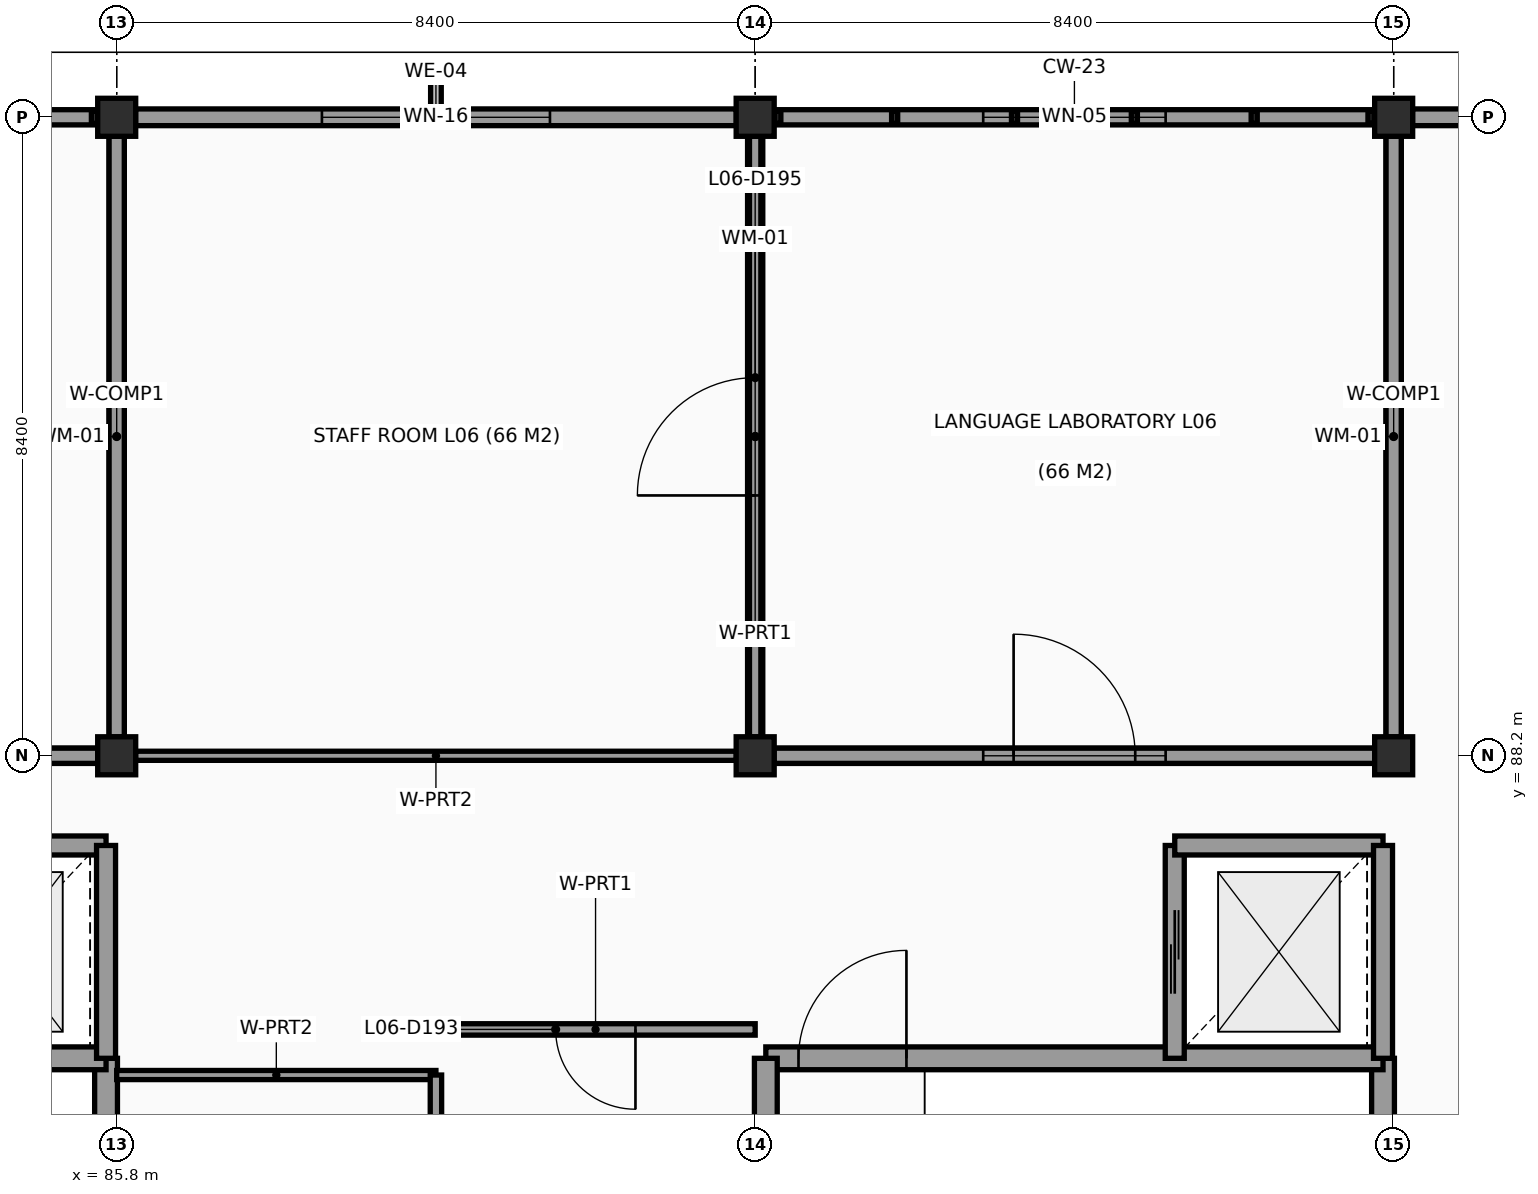
"""IFC4 building model, lengths in metres.
Left out: names, types, materials, properties, quantities, classifications, styles, units other than length and angle.
Written with IfcOpenShell. Run it as: python <this file> out.ifc"""

import sys

from ifc_helpers import new_model, si_unit, direction, frame, frame_2d, origin, origin_2d, place, context, subcontext, project, spatial, rectangle, extrude, element, fill, save


model = new_model("IFC4")
c1 = context("Model", 3, precision=1e-05, world=origin(), true_north=direction((0.0, 1.0)))
c2 = subcontext(c1, "Body", "Model", "MODEL_VIEW")
j1 = project(units=[si_unit("LENGTHUNIT", "METRE"), si_unit("PLANEANGLEUNIT", "RADIAN")], contexts=[c1])
p1 = place(None, origin())
s1 = spatial("IfcSite", under=j1, at=p1, CompositionType="ELEMENT")
p2 = place(p1, origin())
s2 = spatial("IfcBuilding", under=s1, at=p2, CompositionType="ELEMENT")
p3 = place(p2, frame((0.0, 0.0, 22.2)))
s3 = spatial("IfcBuildingStorey", under=s2, at=p3, CompositionType="ELEMENT", Elevation=22.2)
for number, where, z_axis, x_axis in (
    (1, (85.8, 88.2, 0.0), (0.0, 0.0, 1.0), (1.0, 0.0, 0.0)),
    (2, (85.8, 96.6, 0.0), (0.0, 0.0, 1.0), (1.0, 0.0, 0.0)),
    (3, (94.2, 88.2, 0.0), (0.0, 0.0, 1.0), (1.0, 0.0, 0.0)),
    (4, (94.2, 96.6, 0.0), (0.0, 0.0, 1.0), (1.0, 0.0, 0.0)),
    (5, (102.6, 88.2, 0.0), (0.0, 0.0, 1.0), (1.0, 0.0, 0.0)),
    (6, (102.6, 96.6, 0.0), (0.0, 0.0, 1.0), (1.0, 0.0, 0.0)),
):
    element("IfcColumn", number, at=place(p3, frame(where, z_axis=z_axis, x_axis=x_axis)), inside=s3, PredefinedType="COLUMN", context=c2, shape_type="SweptSolid", body=[
        extrude(rectangle(XDim=0.5, YDim=0.5, at=origin_2d()), origin(), (0.0, 0.0, 1.0), 3.38),
    ])
p4 = place(p3, frame((86.048, 96.6, 0.0), z_axis=(0.0, 0.0, 1.0), x_axis=(1.0, 0.0, 0.0)))
e7 = element("IfcWall", 7, at=p4, inside=s3, PredefinedType="SOLIDWALL", context=c2, shape_type="SweptSolid", body=[
    extrude(rectangle(XDim=7.904, YDim=0.22, at=frame_2d((3.952, 0.0))), origin(), (0.0, 0.0, 1.0), 2.68),
])
p5 = place(p4, frame((2.452, 0.0, 0.95)))
e8 = element("IfcOpeningElement", 8, at=p5, cuts=e7, PredefinedType="OPENING", context=c2, shape_type="SweptSolid", body=[
    extrude(rectangle(XDim=3.0, YDim=1.5, at=frame_2d((1.5, 0.75))), frame((0.0, 0.12, 0.0), z_axis=(0.0, -1.0, 0.0), x_axis=(1.0, 0.0, 0.0)), (0.0, 0.0, 1.0), 0.24),
])
p6 = place(p3, frame((102.848, 96.6, 0.0), z_axis=(0.0, 0.0, 1.0), x_axis=(1.0, 0.0, 0.0)))
e9 = element("IfcWall", 9, at=p6, inside=s3, PredefinedType="SOLIDWALL", context=c2, shape_type="SweptSolid", body=[
    extrude(rectangle(XDim=3.872, YDim=0.22, at=frame_2d((1.936, 0.0))), origin(), (0.0, 0.0, 1.0), 3.38),
])
p7 = place(p6, frame((0.736, 0.0, 0.95)))
e10 = element("IfcOpeningElement", 10, at=p7, cuts=e9, PredefinedType="OPENING", context=c2, shape_type="SweptSolid", body=[
    extrude(rectangle(XDim=2.4, YDim=1.2, at=frame_2d((1.2, 0.6))), frame((0.0, 0.12, 0.0), z_axis=(0.0, -1.0, 0.0), x_axis=(1.0, 0.0, 0.0)), (0.0, 0.0, 1.0), 0.24),
])
p8 = place(p3, frame((77.4, 88.2, 3.6), z_axis=(0.0, 0.0, 1.0), x_axis=(1.0, 0.0, 0.0)))
e11 = element("IfcWall", 11, at=p8, inside=s3, PredefinedType="SHEAR", context=c2, shape_type="SweptSolid", body=[
    extrude(rectangle(XDim=8.4, YDim=0.2, at=frame_2d((4.2, 0.0))), origin(), (0.0, 0.0, 1.0), 1.65),
])
p9 = place(p8, frame((3.0, 0.0, 0.25)))
e12 = element("IfcOpeningElement", 12, at=p9, cuts=e11, PredefinedType="OPENING", context=c2, shape_type="SweptSolid", body=[
    extrude(rectangle(XDim=2.4, YDim=1.2, at=frame_2d((1.2, 0.6))), frame((0.0, 0.11, 0.0), z_axis=(0.0, -1.0, 0.0), x_axis=(1.0, 0.0, 0.0)), (0.0, 0.0, 1.0), 0.22),
])
p10 = place(p3, frame((85.8, 88.2, 3.6), z_axis=(0.0, 0.0, 1.0), x_axis=(0.0, 1.0, 0.0)))
e13 = element("IfcWall", 13, at=p10, inside=s3, PredefinedType="SHEAR", context=c2, shape_type="SweptSolid", body=[
    extrude(rectangle(XDim=8.4, YDim=0.2, at=frame_2d((4.2, 0.0))), origin(), (0.0, 0.0, 1.0), 1.65),
])
p11 = place(p3, frame((85.8, 96.6, 3.6), z_axis=(0.0, 0.0, 1.0), x_axis=(-1.0, 0.0, 0.0)))
e14 = element("IfcWall", 14, at=p11, inside=s3, PredefinedType="SHEAR", context=c2, shape_type="SweptSolid", body=[
    extrude(rectangle(XDim=8.4, YDim=0.2, at=frame_2d((4.2, 0.0))), origin(), (0.0, 0.0, 1.0), 1.65),
])
p12 = place(p11, frame((3.0, 0.0, 0.25)))
e15 = element("IfcOpeningElement", 15, at=p12, cuts=e14, PredefinedType="OPENING", context=c2, shape_type="SweptSolid", body=[
    extrude(rectangle(XDim=2.4, YDim=1.2, at=frame_2d((1.2, 0.6))), frame((0.0, 0.11, 0.0), z_axis=(0.0, -1.0, 0.0), x_axis=(1.0, 0.0, 0.0)), (0.0, 0.0, 1.0), 0.22),
])
p13 = place(p3, frame((94.2, 88.2, 3.6), z_axis=(0.0, 0.0, 1.0), x_axis=(1.0, 0.0, 0.0)))
e16 = element("IfcWall", 16, at=p13, inside=s3, PredefinedType="SHEAR", context=c2, shape_type="SweptSolid", body=[
    extrude(rectangle(XDim=8.4, YDim=0.2, at=frame_2d((4.2, 0.0))), origin(), (0.0, 0.0, 1.0), 1.65),
])
p14 = place(p13, frame((3.0, 0.0, 0.25)))
e17 = element("IfcOpeningElement", 17, at=p14, cuts=e16, PredefinedType="OPENING", context=c2, shape_type="SweptSolid", body=[
    extrude(rectangle(XDim=2.4, YDim=1.2, at=frame_2d((1.2, 0.6))), frame((0.0, 0.11, 0.0), z_axis=(0.0, -1.0, 0.0), x_axis=(1.0, 0.0, 0.0)), (0.0, 0.0, 1.0), 0.22),
])
p15 = place(p3, frame((102.6, 88.2, 3.6), z_axis=(0.0, 0.0, 1.0), x_axis=(0.0, 1.0, 0.0)))
e18 = element("IfcWall", 18, at=p15, inside=s3, PredefinedType="SHEAR", context=c2, shape_type="SweptSolid", body=[
    extrude(rectangle(XDim=8.4, YDim=0.2, at=frame_2d((4.2, 0.0))), origin(), (0.0, 0.0, 1.0), 1.65),
])
p16 = place(p3, frame((102.6, 96.6, 3.6), z_axis=(0.0, 0.0, 1.0), x_axis=(-1.0, 0.0, 0.0)))
e19 = element("IfcWall", 19, at=p16, inside=s3, PredefinedType="SHEAR", context=c2, shape_type="SweptSolid", body=[
    extrude(rectangle(XDim=8.4, YDim=0.2, at=frame_2d((4.2, 0.0))), origin(), (0.0, 0.0, 1.0), 1.65),
])
p17 = place(p16, frame((3.0, 0.0, 0.25)))
e20 = element("IfcOpeningElement", 20, at=p17, cuts=e19, PredefinedType="OPENING", context=c2, shape_type="SweptSolid", body=[
    extrude(rectangle(XDim=2.4, YDim=1.2, at=frame_2d((1.2, 0.6))), frame((0.0, 0.11, 0.0), z_axis=(0.0, -1.0, 0.0), x_axis=(1.0, 0.0, 0.0)), (0.0, 0.0, 1.0), 0.22),
])
p18 = place(p3, frame((94.2, 96.6, 3.6), z_axis=(0.0, 0.0, 1.0), x_axis=(0.0, -1.0, 0.0)))
e21 = element("IfcWall", 21, at=p18, inside=s3, PredefinedType="SHEAR", context=c2, shape_type="SweptSolid", body=[
    extrude(rectangle(XDim=8.4, YDim=0.2, at=frame_2d((4.2, 0.0))), origin(), (0.0, 0.0, 1.0), 1.65),
])
p19 = place(p3, frame((85.66, 79.94, 0.0), z_axis=(0.0, 0.0, 1.0), x_axis=(0.0, 1.0, 0.0)))
e22 = element("IfcWall", 22, at=p19, inside=s3, PredefinedType="SHEAR", context=c2, shape_type="SweptSolid", body=[
    extrude(rectangle(XDim=4.28, YDim=0.3, at=frame_2d((2.14, 0.0))), origin(), (0.0, 0.0, 1.0), 3.38),
])
p20 = place(p3, frame((85.66, 84.22, 0.0), z_axis=(0.0, 0.0, 1.0), x_axis=(-1.0, 0.0, 0.0)))
e23 = element("IfcWall", 23, at=p20, inside=s3, PredefinedType="SHEAR", context=c2, shape_type="SweptSolid", body=[
    extrude(rectangle(XDim=8.12, YDim=0.3, at=frame_2d((4.06, 0.0))), origin(), (0.0, 0.0, 1.0), 3.38),
])
p21 = place(p20, frame((6.27, 0.0, 0.0)))
e24 = element("IfcOpeningElement", 24, at=p21, cuts=e23, PredefinedType="OPENING", context=c2, shape_type="SweptSolid", body=[
    extrude(rectangle(XDim=1.35, YDim=2.15, at=frame_2d((0.675, 1.075))), frame((0.0, 0.16, 0.0), z_axis=(0.0, -1.0, 0.0), x_axis=(1.0, 0.0, 0.0)), (0.0, 0.0, 1.0), 0.32),
])
p22 = place(p3, frame((85.66, 87.02, 0.0), z_axis=(0.0, 0.0, 1.0), x_axis=(-1.0, 0.0, 0.0)))
e25 = element("IfcWall", 25, at=p22, inside=s3, PredefinedType="SHEAR", context=c2, shape_type="SweptSolid", body=[
    extrude(rectangle(XDim=2.74, YDim=0.25, at=frame_2d((1.37, 0.0))), origin(), (0.0, 0.0, 1.0), 3.38),
])
p23 = place(p3, frame((85.66, 84.22, 0.0), z_axis=(0.0, 0.0, 1.0), x_axis=(0.0, 1.0, 0.0)))
e26 = element("IfcWall", 26, at=p23, inside=s3, PredefinedType="SHEAR", context=c2, shape_type="SweptSolid", body=[
    extrude(rectangle(XDim=2.8, YDim=0.25, at=frame_2d((1.4, 0.0))), origin(), (0.0, 0.0, 1.0), 3.38),
])
p24 = place(p3, frame((102.46, 79.94, 0.0), z_axis=(0.0, 0.0, 1.0), x_axis=(0.0, 1.0, 0.0)))
e27 = element("IfcWall", 27, at=p24, inside=s3, PredefinedType="SHEAR", context=c2, shape_type="SweptSolid", body=[
    extrude(rectangle(XDim=4.28, YDim=0.3, at=frame_2d((2.14, 0.0))), origin(), (0.0, 0.0, 1.0), 3.38),
])
p25 = place(p3, frame((102.46, 84.22, 0.0), z_axis=(0.0, 0.0, 1.0), x_axis=(-1.0, 0.0, 0.0)))
e28 = element("IfcWall", 28, at=p25, inside=s3, PredefinedType="SHEAR", context=c2, shape_type="SweptSolid", body=[
    extrude(rectangle(XDim=8.12, YDim=0.3, at=frame_2d((4.06, 0.0))), origin(), (0.0, 0.0, 1.0), 3.38),
])
p26 = place(p25, frame((6.27, 0.0, 0.0)))
e29 = element("IfcOpeningElement", 29, at=p26, cuts=e28, PredefinedType="OPENING", context=c2, shape_type="SweptSolid", body=[
    extrude(rectangle(XDim=1.42, YDim=2.15, at=frame_2d((0.71, 1.075))), frame((0.0, 0.16, 0.0), z_axis=(0.0, -1.0, 0.0), x_axis=(1.0, 0.0, 0.0)), (0.0, 0.0, 1.0), 0.32),
])
p27 = place(p3, frame((94.34, 84.22, 0.0), z_axis=(0.0, 0.0, 1.0), x_axis=(0.0, -1.0, 0.0)))
e30 = element("IfcWall", 30, at=p27, inside=s3, PredefinedType="SHEAR", context=c2, shape_type="SweptSolid", body=[
    extrude(rectangle(XDim=4.28, YDim=0.3, at=frame_2d((2.14, 0.0))), origin(), (0.0, 0.0, 1.0), 3.38),
])
p28 = place(p3, frame((99.72, 87.02, 0.0), z_axis=(0.0, 0.0, 1.0), x_axis=(0.0, -1.0, 0.0)))
e31 = element("IfcWall", 31, at=p28, inside=s3, PredefinedType="SHEAR", context=c2, shape_type="SweptSolid", body=[
    extrude(rectangle(XDim=2.8, YDim=0.25, at=frame_2d((1.4, 0.0))), origin(), (0.0, 0.0, 1.0), 3.38),
])
p29 = place(p28, frame((0.85, 0.0, 0.0)))
e32 = element("IfcOpeningElement", 32, at=p29, cuts=e31, PredefinedType="OPENING", context=c2, shape_type="SweptSolid", body=[
    extrude(rectangle(XDim=1.1, YDim=2.15, at=frame_2d((0.55, 1.075))), frame((0.0, 0.135, 0.0), z_axis=(0.0, -1.0, 0.0), x_axis=(1.0, 0.0, 0.0)), (0.0, 0.0, 1.0), 0.27),
])
p30 = place(p3, frame((102.46, 87.02, 0.0), z_axis=(0.0, 0.0, 1.0), x_axis=(-1.0, 0.0, 0.0)))
e33 = element("IfcWall", 33, at=p30, inside=s3, PredefinedType="SHEAR", context=c2, shape_type="SweptSolid", body=[
    extrude(rectangle(XDim=2.74, YDim=0.25, at=frame_2d((1.37, 0.0))), origin(), (0.0, 0.0, 1.0), 3.38),
])
p31 = place(p3, frame((102.46, 84.22, 0.0), z_axis=(0.0, 0.0, 1.0), x_axis=(0.0, 1.0, 0.0)))
e34 = element("IfcWall", 34, at=p31, inside=s3, PredefinedType="SHEAR", context=c2, shape_type="SweptSolid", body=[
    extrude(rectangle(XDim=2.8, YDim=0.25, at=frame_2d((1.4, 0.0))), origin(), (0.0, 0.0, 1.0), 3.38),
])
p32 = place(p3, frame((85.8, 84.0, 0.0), z_axis=(0.0, 0.0, 1.0), x_axis=(1.0, 0.0, 0.0)))
e35 = element("IfcWall", 35, at=p32, inside=s3, PredefinedType="PARTITIONING", context=c2, shape_type="SweptSolid", body=[
    extrude(rectangle(XDim=4.2, YDim=0.12, at=frame_2d((2.1, 0.0))), origin(), (0.0, 0.0, 1.0), 3.02),
])
p33 = place(p3, frame((90.0, 84.0, 0.0), z_axis=(0.0, 0.0, 1.0), x_axis=(0.0, -1.0, 0.0)))
e36 = element("IfcWall", 36, at=p33, inside=s3, PredefinedType="PARTITIONING", context=c2, shape_type="SweptSolid", body=[
    extrude(rectangle(XDim=4.2, YDim=0.15, at=frame_2d((2.1, 0.0))), origin(), (0.0, 0.0, 1.0), 2.88),
])
p34 = place(p33, frame((2.175, 0.0, 0.0)))
e37 = element("IfcOpeningElement", 37, at=p34, cuts=e36, PredefinedType="OPENING", context=c2, shape_type="SweptSolid", body=[
    extrude(rectangle(XDim=1.15, YDim=2.15, at=frame_2d((0.575, 1.075))), frame((0.0, 0.085, 0.0), z_axis=(0.0, -1.0, 0.0), x_axis=(1.0, 0.0, 0.0)), (0.0, 0.0, 1.0), 0.17),
])
p35 = place(p3, frame((90.0, 84.6, 0.0), z_axis=(0.0, 0.0, 1.0), x_axis=(1.0, 0.0, 0.0)))
e38 = element("IfcWall", 38, at=p35, inside=s3, PredefinedType="PARTITIONING", context=c2, shape_type="SweptSolid", body=[
    extrude(rectangle(XDim=4.2, YDim=0.15, at=frame_2d((2.1, 0.0))), origin(), (0.0, 0.0, 1.0), 2.73),
])
p36 = place(p35, frame((1.575, 0.0, 0.0)))
e39 = element("IfcOpeningElement", 39, at=p36, cuts=e38, PredefinedType="OPENING", context=c2, shape_type="SweptSolid", body=[
    extrude(rectangle(XDim=1.05, YDim=2.15, at=frame_2d((0.525, 1.075))), frame((0.0, 0.085, 0.0), z_axis=(0.0, -1.0, 0.0), x_axis=(1.0, 0.0, 0.0)), (0.0, 0.0, 1.0), 0.17),
])
p37 = place(p3, frame((85.8, 96.352, 0.0), z_axis=(0.0, 0.0, 1.0), x_axis=(0.0, -1.0, 0.0)))
e40 = element("IfcWall", 40, at=p37, inside=s3, PredefinedType="PARTITIONING", context=c2, shape_type="SweptSolid", body=[
    extrude(rectangle(XDim=7.904, YDim=0.2, at=frame_2d((3.952, 0.0))), origin(), (0.0, 0.0, 1.0), 3.02),
])
p38 = place(p3, frame((85.552, 88.2, 0.0), z_axis=(0.0, 0.0, 1.0), x_axis=(-1.0, 0.0, 0.0)))
e41 = element("IfcWall", 41, at=p38, inside=s3, PredefinedType="PARTITIONING", context=c2, shape_type="SweptSolid", body=[
    extrude(rectangle(XDim=7.904, YDim=0.2, at=frame_2d((3.952, 0.0))), origin(), (0.0, 0.0, 1.0), 2.99),
])
p39 = place(p38, frame((3.352, 0.0, 0.0)))
e42 = element("IfcOpeningElement", 42, at=p39, cuts=e41, PredefinedType="OPENING", context=c2, shape_type="SweptSolid", body=[
    extrude(rectangle(XDim=1.2, YDim=2.15, at=frame_2d((0.6, 1.075))), frame((0.0, 0.11, 0.0), z_axis=(0.0, -1.0, 0.0), x_axis=(1.0, 0.0, 0.0)), (0.0, 0.0, 1.0), 0.22),
])
p40 = place(p3, frame((93.952, 88.2, 0.0), z_axis=(0.0, 0.0, 1.0), x_axis=(-1.0, 0.0, 0.0)))
e43 = element("IfcWall", 43, at=p40, inside=s3, PredefinedType="PARTITIONING", context=c2, shape_type="SweptSolid", body=[
    extrude(rectangle(XDim=7.904, YDim=0.12, at=frame_2d((3.952, 0.0))), origin(), (0.0, 0.0, 1.0), 2.99),
])
p41 = place(p3, frame((94.2, 96.352, 0.0), z_axis=(0.0, 0.0, 1.0), x_axis=(0.0, -1.0, 0.0)))
e44 = element("IfcWall", 44, at=p41, inside=s3, PredefinedType="PARTITIONING", context=c2, shape_type="SweptSolid", body=[
    extrude(rectangle(XDim=7.904, YDim=0.15, at=frame_2d((3.952, 0.0))), origin(), (0.0, 0.0, 1.0), 2.73),
])
p42 = place(p41, frame((3.177, 0.0, 0.0)))
e45 = element("IfcOpeningElement", 45, at=p42, cuts=e44, PredefinedType="OPENING", context=c2, shape_type="SweptSolid", body=[
    extrude(rectangle(XDim=1.55, YDim=2.2, at=frame_2d((0.775, 1.1))), frame((0.0, 0.085, 0.0), z_axis=(0.0, -1.0, 0.0), x_axis=(1.0, 0.0, 0.0)), (0.0, 0.0, 1.0), 0.17),
])
p43 = place(p3, frame((102.352, 88.2, 0.0), z_axis=(0.0, 0.0, 1.0), x_axis=(-1.0, 0.0, 0.0)))
e46 = element("IfcWall", 46, at=p43, inside=s3, PredefinedType="PARTITIONING", context=c2, shape_type="SweptSolid", body=[
    extrude(rectangle(XDim=7.904, YDim=0.2, at=frame_2d((3.952, 0.0))), origin(), (0.0, 0.0, 1.0), 2.99),
])
p44 = place(p43, frame((3.152, 0.0, 0.0)))
e47 = element("IfcOpeningElement", 47, at=p44, cuts=e46, PredefinedType="OPENING", context=c2, shape_type="SweptSolid", body=[
    extrude(rectangle(XDim=1.6, YDim=2.2, at=frame_2d((0.8, 1.1))), frame((0.0, 0.11, 0.0), z_axis=(0.0, -1.0, 0.0), x_axis=(1.0, 0.0, 0.0)), (0.0, 0.0, 1.0), 0.22),
])
p45 = place(p3, frame((102.6, 96.352, 0.0), z_axis=(0.0, 0.0, 1.0), x_axis=(0.0, -1.0, 0.0)))
e48 = element("IfcWall", 48, at=p45, inside=s3, PredefinedType="PARTITIONING", context=c2, shape_type="SweptSolid", body=[
    extrude(rectangle(XDim=7.904, YDim=0.2, at=frame_2d((3.952, 0.0))), origin(), (0.0, 0.0, 1.0), 2.78),
])
p46 = place(p5, origin())
e49 = element("IfcWindow", 49, at=p46, inside=s3, PartitioningType="SINGLE_PANEL", PredefinedType="WINDOW", context=c2, shape_type="SweptSolid", body=[
    extrude(rectangle(XDim=3.0, YDim=1.5, at=frame_2d((1.5, 0.75))), frame((0.0, 0.03, 0.0), z_axis=(0.0, -1.0, 0.0), x_axis=(1.0, 0.0, 0.0)), (0.0, 0.0, 1.0), 0.06),
])
fill(e8, e49)
p47 = place(p14, origin())
e50 = element("IfcWindow", 50, at=p47, inside=s3, PartitioningType="SINGLE_PANEL", PredefinedType="WINDOW", context=c2, shape_type="SweptSolid", body=[
    extrude(rectangle(XDim=2.4, YDim=1.2, at=frame_2d((1.2, 0.6))), frame((0.0, 0.03, 0.0), z_axis=(0.0, -1.0, 0.0), x_axis=(1.0, 0.0, 0.0)), (0.0, 0.0, 1.0), 0.06),
])
fill(e17, e50)
p48 = place(p17, origin())
e51 = element("IfcWindow", 51, at=p48, inside=s3, PartitioningType="SINGLE_PANEL", PredefinedType="WINDOW", context=c2, shape_type="SweptSolid", body=[
    extrude(rectangle(XDim=2.4, YDim=1.2, at=frame_2d((1.2, 0.6))), frame((0.0, 0.03, 0.0), z_axis=(0.0, -1.0, 0.0), x_axis=(1.0, 0.0, 0.0)), (0.0, 0.0, 1.0), 0.06),
])
fill(e20, e51)
p49 = place(p26, frame((1.42, 0.0, 0.0), z_axis=(0.0, 0.0, 1.0), x_axis=(-1.0, 0.0, 0.0)))
e52 = element("IfcDoor", 52, at=p49, inside=s3, OperationType="SINGLE_SWING_LEFT", PredefinedType="DOOR", context=c2, shape_type="SweptSolid", body=[
    extrude(rectangle(XDim=1.42, YDim=2.15, at=frame_2d((0.71, 1.075))), frame((0.0, 0.025, 0.0), z_axis=(0.0, -1.0, 0.0), x_axis=(1.0, 0.0, 0.0)), (0.0, 0.0, 1.0), 0.05),
])
fill(e29, e52)
p50 = place(p29, origin())
e53 = element("IfcDoor", 53, at=p50, inside=s3, OperationType="DOUBLE_DOOR_SLIDING", PredefinedType="DOOR", context=c2, shape_type="SweptSolid", body=[
    extrude(rectangle(XDim=1.1, YDim=2.15, at=frame_2d((0.55, 1.075))), frame((0.0, 0.025, 0.0), z_axis=(0.0, -1.0, 0.0), x_axis=(1.0, 0.0, 0.0)), (0.0, 0.0, 1.0), 0.05),
])
fill(e32, e53)
p51 = place(p36, origin())
e54 = element("IfcDoor", 54, at=p51, inside=s3, OperationType="SINGLE_SWING_RIGHT", PredefinedType="DOOR", context=c2, shape_type="SweptSolid", body=[
    extrude(rectangle(XDim=1.05, YDim=2.15, at=frame_2d((0.525, 1.075))), frame((0.0, 0.025, 0.0), z_axis=(0.0, -1.0, 0.0), x_axis=(1.0, 0.0, 0.0)), (0.0, 0.0, 1.0), 0.05),
])
fill(e39, e54)
p52 = place(p42, origin())
e55 = element("IfcDoor", 55, at=p52, inside=s3, OperationType="DOUBLE_DOOR_SINGLE_SWING", PredefinedType="DOOR", context=c2, shape_type="SweptSolid", body=[
    extrude(rectangle(XDim=1.55, YDim=2.2, at=frame_2d((0.775, 1.1))), frame((0.0, 0.025, 0.0), z_axis=(0.0, -1.0, 0.0), x_axis=(1.0, 0.0, 0.0)), (0.0, 0.0, 1.0), 0.05),
])
fill(e45, e55)
p53 = place(p44, origin())
e56 = element("IfcDoor", 56, at=p53, inside=s3, OperationType="DOUBLE_DOOR_SINGLE_SWING", PredefinedType="DOOR", context=c2, shape_type="SweptSolid", body=[
    extrude(rectangle(XDim=1.6, YDim=2.2, at=frame_2d((0.8, 1.1))), frame((0.0, 0.025, 0.0), z_axis=(0.0, -1.0, 0.0), x_axis=(1.0, 0.0, 0.0)), (0.0, 0.0, 1.0), 0.05),
])
fill(e47, e56)
save(model, sys.argv[1])
